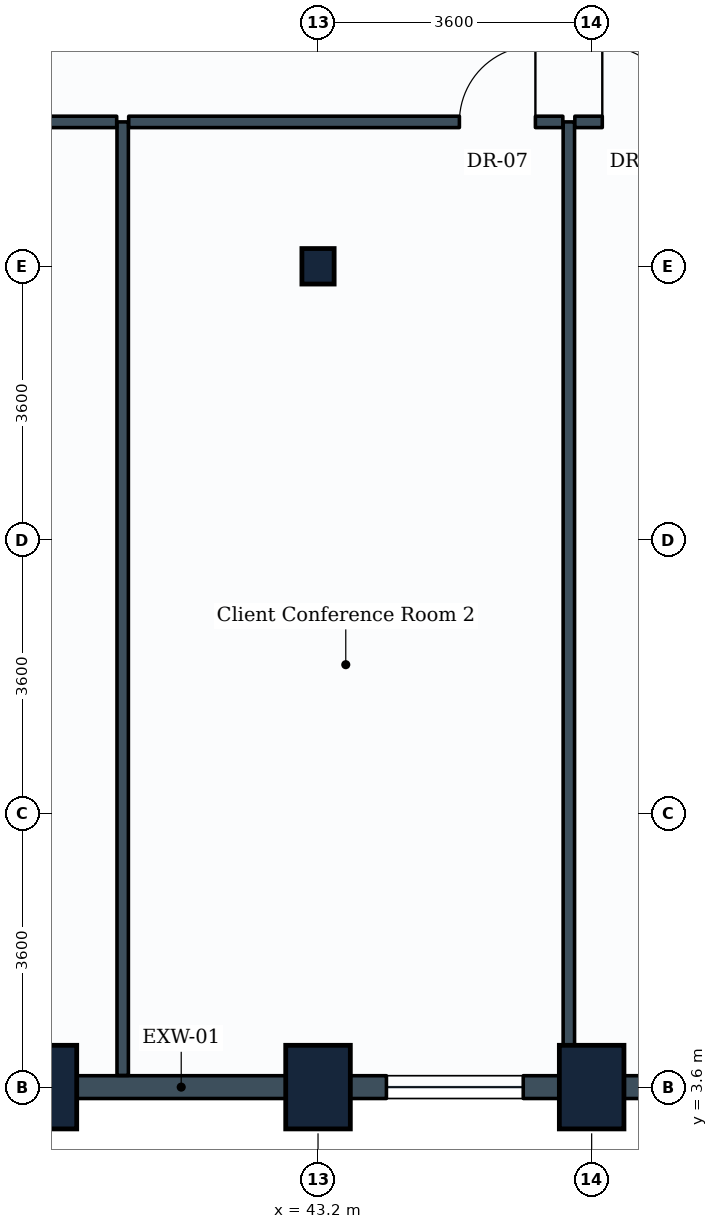
"""IFC4 building model, lengths in metres.
Left out: names, types, materials, properties, quantities, classifications, styles, units other than length and angle.
Written with IfcOpenShell. Run it as: python <this file> out.ifc"""

import sys

from ifc_helpers import new_model, si_unit, direction, frame, frame_2d, origin, origin_2d, place, context, subcontext, project, spatial, rectangle, i_section, extrude, element, fill, save


model = new_model("IFC4")
c1 = context("Model", 3, precision=1e-05, world=origin(), true_north=direction((0.0, 1.0)))
c2 = subcontext(c1, "Body", "Model", "MODEL_VIEW")
j1 = project(units=[si_unit("LENGTHUNIT", "METRE"), si_unit("PLANEANGLEUNIT", "RADIAN")], contexts=[c1])
p1 = place(None, origin())
s1 = spatial("IfcSite", under=j1, at=p1, CompositionType="ELEMENT")
p2 = place(p1, origin())
s2 = spatial("IfcBuilding", under=s1, at=p2, CompositionType="ELEMENT")
p3 = place(p2, frame((0.0, 0.0, 80.1)))
s3 = spatial("IfcBuildingStorey", under=s2, at=p3, CompositionType="ELEMENT", Elevation=80.1)
for number, where, z_axis, x_axis in (
    (1, (39.6, 3.6, 0.0), (0.0, 0.0, 1.0), (1.0, 0.0, 0.0)),
    (2, (43.2, 3.6, 0.0), (0.0, 0.0, 1.0), (1.0, 0.0, 0.0)),
):
    element("IfcColumn", number, at=place(p3, frame(where, z_axis=z_axis, x_axis=x_axis)), inside=s3, PredefinedType="COLUMN", context=c2, shape_type="SweptSolid", body=[
        extrude(rectangle(XDim=0.85, YDim=1.1, at=origin_2d()), origin(), (0.0, 0.0, 1.0), 3.9),
    ])
p4 = place(p3, frame((43.2, 14.4, 0.0), z_axis=(0.0, 0.0, 1.0), x_axis=(1.0, 0.0, 0.0)))
e3 = element("IfcColumn", 3, at=p4, inside=s3, PredefinedType="COLUMN", context=c2, shape_type="SweptSolid", body=[
    extrude(i_section(OverallWidth=0.424, OverallDepth=0.467, WebThickness=0.033, FlangeThickness=0.053, FilletRadius=0.015, at=origin_2d()), origin(), (0.0, 0.0, 1.0), 3.9),
])
p5 = place(p3, frame((46.8, 3.6, 0.0), z_axis=(0.0, 0.0, 1.0), x_axis=(1.0, 0.0, 0.0)))
e4 = element("IfcColumn", 4, at=p5, inside=s3, PredefinedType="COLUMN", context=c2, shape_type="SweptSolid", body=[
    extrude(rectangle(XDim=0.85, YDim=1.1, at=origin_2d()), origin(), (0.0, 0.0, 1.0), 3.9),
])
p6 = place(p3, frame((43.2, 3.6, 0.0), z_axis=(0.0, 0.0, 1.0), x_axis=(-1.0, 0.0, 0.0)))
e5 = element("IfcWall", 5, at=p6, inside=s3, PredefinedType="STANDARD", context=c2, shape_type="SweptSolid", body=[
    extrude(rectangle(XDim=3.6, YDim=0.3, at=frame_2d((1.8, 0.0))), origin(), (0.0, 0.0, 1.0), 2.93),
])
p7 = place(p3, frame((46.8, 3.6, 0.0), z_axis=(0.0, 0.0, 1.0), x_axis=(-1.0, 0.0, 0.0)))
e6 = element("IfcWall", 6, at=p7, inside=s3, PredefinedType="STANDARD", context=c2, shape_type="SweptSolid", body=[
    extrude(rectangle(XDim=3.6, YDim=0.3, at=frame_2d((1.8, 0.0))), origin(), (0.0, 0.0, 1.0), 2.93),
])
p8 = place(p7, frame((0.9, 0.0, 0.85)))
e7 = element("IfcOpeningElement", 7, at=p8, cuts=e6, PredefinedType="OPENING", context=c2, shape_type="SweptSolid", body=[
    extrude(rectangle(XDim=1.8, YDim=1.35, at=frame_2d((0.9, 0.675))), frame((0.0, 0.16, 0.0), z_axis=(0.0, -1.0, 0.0), x_axis=(1.0, 0.0, 0.0)), (0.0, 0.0, 1.0), 0.32),
])
p9 = place(p3, frame((50.4, 3.6, 0.0), z_axis=(0.0, 0.0, 1.0), x_axis=(-1.0, 0.0, 0.0)))
e8 = element("IfcWall", 8, at=p9, inside=s3, PredefinedType="STANDARD", context=c2, shape_type="SweptSolid", body=[
    extrude(rectangle(XDim=3.6, YDim=0.3, at=frame_2d((1.8, 0.0))), origin(), (0.0, 0.0, 1.0), 2.93),
])
p10 = place(p9, frame((0.9, 0.0, 0.85)))
e9 = element("IfcOpeningElement", 9, at=p10, cuts=e8, PredefinedType="OPENING", context=c2, shape_type="SweptSolid", body=[
    extrude(rectangle(XDim=1.8, YDim=1.35, at=frame_2d((0.9, 0.675))), frame((0.0, 0.16, 0.0), z_axis=(0.0, -1.0, 0.0), x_axis=(1.0, 0.0, 0.0)), (0.0, 0.0, 1.0), 0.32),
])
p11 = place(p3, frame((40.63, 3.754, 0.0), z_axis=(0.0, 0.0, 1.0), x_axis=(0.0, 1.0, 0.0)))
e10 = element("IfcWall", 10, at=p11, inside=s3, PredefinedType="PARTITIONING", context=c2, shape_type="SweptSolid", body=[
    extrude(rectangle(XDim=12.546, YDim=0.15, at=frame_2d((6.273, 0.0))), origin(), (0.0, 0.0, 1.0), 2.93),
])
p12 = place(p3, frame((34.479, 16.3, 0.0), z_axis=(0.0, 0.0, 1.0), x_axis=(1.0, 0.0, 0.0)))
e11 = element("IfcWall", 11, at=p12, inside=s3, PredefinedType="PARTITIONING", context=c2, shape_type="SweptSolid", body=[
    extrude(rectangle(XDim=6.072, YDim=0.15, at=frame_2d((3.036, 0.0))), origin(), (0.0, 0.0, 1.0), 3.18),
])
p13 = place(p12, frame((2.496, 0.0, 0.0)))
e12 = element("IfcOpeningElement", 12, at=p13, cuts=e11, PredefinedType="OPENING", context=c2, shape_type="SweptSolid", body=[
    extrude(rectangle(XDim=1.0, YDim=2.1, at=frame_2d((0.5, 1.05))), frame((0.0, 0.085, 0.0), z_axis=(0.0, -1.0, 0.0), x_axis=(1.0, 0.0, 0.0)), (0.0, 0.0, 1.0), 0.17),
])
p14 = place(p3, frame((46.5, 3.754, 0.0), z_axis=(0.0, 0.0, 1.0), x_axis=(0.0, 1.0, 0.0)))
e13 = element("IfcWall", 13, at=p14, inside=s3, PredefinedType="PARTITIONING", context=c2, shape_type="SweptSolid", body=[
    extrude(rectangle(XDim=12.546, YDim=0.15, at=frame_2d((6.273, 0.0))), origin(), (0.0, 0.0, 1.0), 2.93),
])
p15 = place(p3, frame((40.709, 16.3, 0.0), z_axis=(0.0, 0.0, 1.0), x_axis=(1.0, 0.0, 0.0)))
e14 = element("IfcWall", 14, at=p15, inside=s3, PredefinedType="PARTITIONING", context=c2, shape_type="SweptSolid", body=[
    extrude(rectangle(XDim=5.712, YDim=0.15, at=frame_2d((2.856, 0.0))), origin(), (0.0, 0.0, 1.0), 3.24),
])
p16 = place(p15, frame((4.351, 0.0, 0.0)))
e15 = element("IfcOpeningElement", 15, at=p16, cuts=e14, PredefinedType="OPENING", context=c2, shape_type="SweptSolid", body=[
    extrude(rectangle(XDim=1.0, YDim=2.1, at=frame_2d((0.5, 1.05))), frame((0.0, 0.085, 0.0), z_axis=(0.0, -1.0, 0.0), x_axis=(1.0, 0.0, 0.0)), (0.0, 0.0, 1.0), 0.17),
])
p17 = place(p3, frame((46.579, 16.3, 0.0), z_axis=(0.0, 0.0, 1.0), x_axis=(1.0, 0.0, 0.0)))
e16 = element("IfcWall", 16, at=p17, inside=s3, PredefinedType="PARTITIONING", context=c2, shape_type="SweptSolid", body=[
    extrude(rectangle(XDim=5.621, YDim=0.15, at=frame_2d((2.811, 0.0))), origin(), (0.0, 0.0, 1.0), 3.19),
])
p18 = place(p17, frame((0.361, 0.0, 0.0)))
e17 = element("IfcOpeningElement", 17, at=p18, cuts=e16, PredefinedType="OPENING", context=c2, shape_type="SweptSolid", body=[
    extrude(rectangle(XDim=1.0, YDim=2.1, at=frame_2d((0.5, 1.05))), frame((0.0, 0.085, 0.0), z_axis=(0.0, -1.0, 0.0), x_axis=(1.0, 0.0, 0.0)), (0.0, 0.0, 1.0), 0.17),
])
p19 = place(p8, origin())
e18 = element("IfcWindow", 18, at=p19, inside=s3, PartitioningType="SINGLE_PANEL", PredefinedType="WINDOW", context=c2, shape_type="SweptSolid", body=[
    extrude(rectangle(XDim=1.8, YDim=1.35, at=frame_2d((0.9, 0.675))), frame((0.0, 0.03, 0.0), z_axis=(0.0, -1.0, 0.0), x_axis=(1.0, 0.0, 0.0)), (0.0, 0.0, 1.0), 0.06),
])
fill(e7, e18)
p20 = place(p16, origin())
e19 = element("IfcDoor", 19, at=p20, inside=s3, OperationType="SINGLE_SWING_RIGHT", PredefinedType="DOOR", context=c2, shape_type="SweptSolid", body=[
    extrude(rectangle(XDim=1.0, YDim=2.1, at=frame_2d((0.5, 1.05))), frame((0.0, 0.025, 0.0), z_axis=(0.0, -1.0, 0.0), x_axis=(1.0, 0.0, 0.0)), (0.0, 0.0, 1.0), 0.05),
])
fill(e15, e19)
p21 = place(p18, origin())
e20 = element("IfcDoor", 20, at=p21, inside=s3, OperationType="SINGLE_SWING_LEFT", PredefinedType="DOOR", context=c2, shape_type="SweptSolid", body=[
    extrude(rectangle(XDim=1.0, YDim=2.1, at=frame_2d((0.5, 1.05))), frame((0.0, 0.025, 0.0), z_axis=(0.0, -1.0, 0.0), x_axis=(1.0, 0.0, 0.0)), (0.0, 0.0, 1.0), 0.05),
])
fill(e17, e20)
save(model, sys.argv[1])
